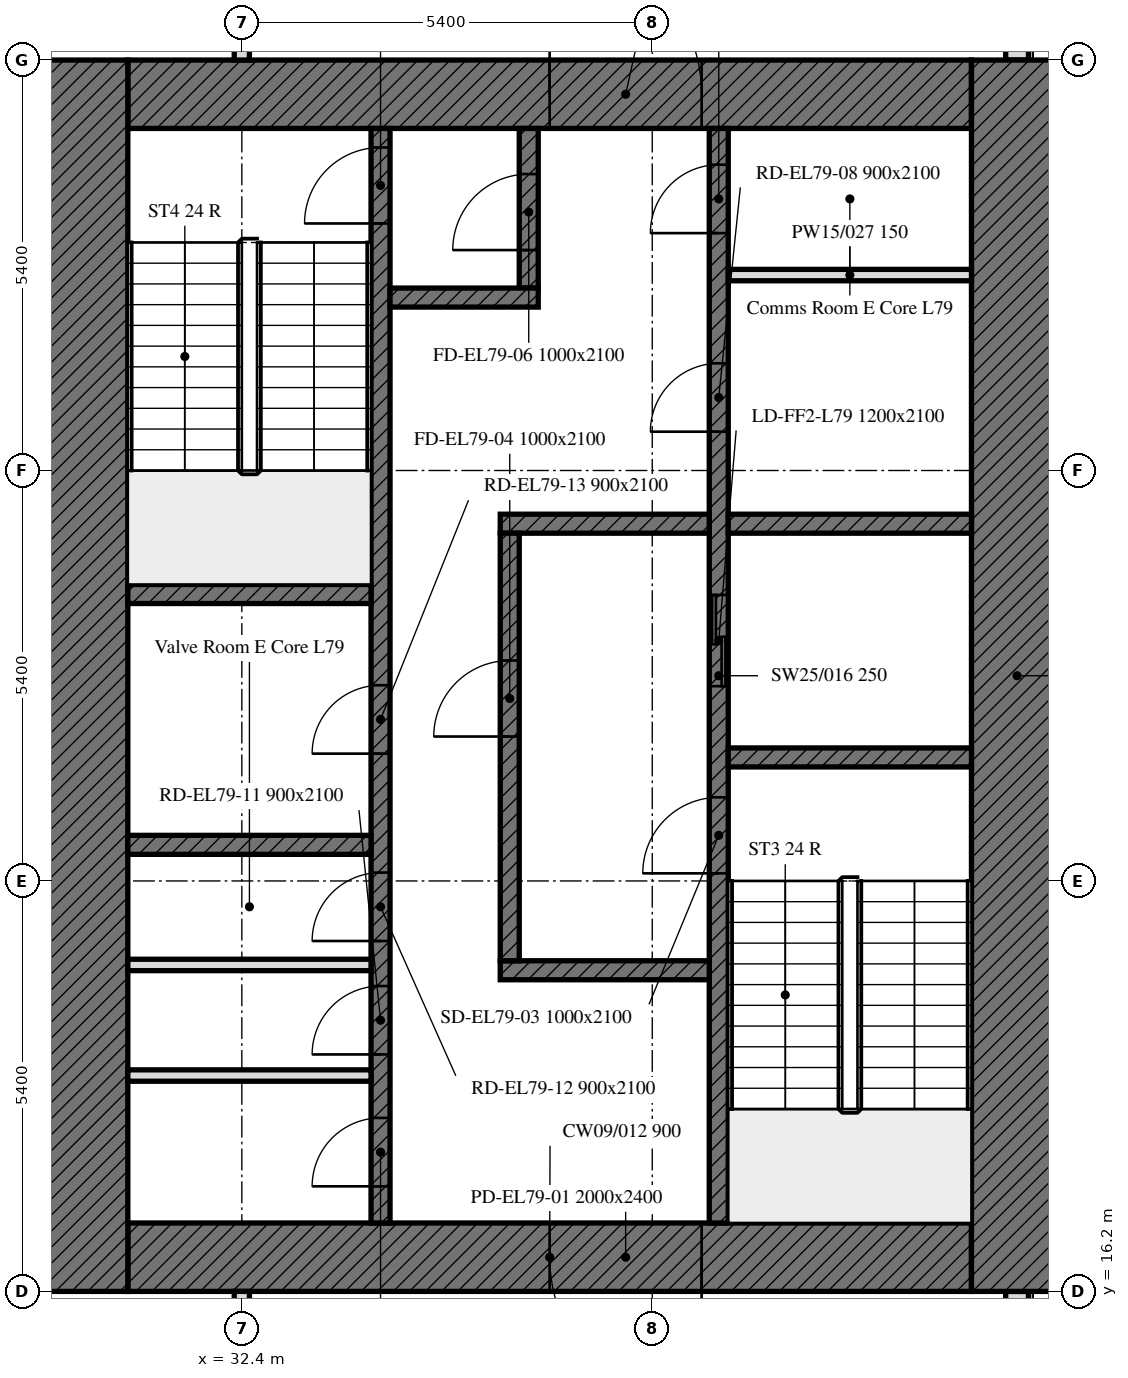
"""IFC4 building model, lengths in metres.
Left out: names, types, materials, properties, quantities, classifications, styles, units other than length and angle.
Written with IfcOpenShell. Run it as: python <this file> out.ifc"""

import sys

from ifc_helpers import new_model, si_unit, direction, frame, frame_2d, origin, place, context, subcontext, project, spatial, polyline, rectangle, outline, extrude, element, fill, save


model = new_model("IFC4")
c1 = context("Model", 3, precision=1e-05, world=origin(), true_north=direction((0.0, 1.0)))
c2 = subcontext(c1, "Body", "Model", "MODEL_VIEW")
j1 = project(units=[si_unit("LENGTHUNIT", "METRE"), si_unit("PLANEANGLEUNIT", "RADIAN")], contexts=[c1])
p1 = place(None, origin())
s1 = spatial("IfcSite", under=j1, at=p1, CompositionType="ELEMENT")
p2 = place(p1, origin())
s2 = spatial("IfcBuilding", under=s1, at=p2, CompositionType="ELEMENT")
p3 = place(p2, frame((0.0, 0.0, 317.2)))
s3 = spatial("IfcBuildingStorey", under=s2, at=p3, CompositionType="ELEMENT", Elevation=317.2)
p4 = place(p3, frame((42.6, 10.986, 0.0), z_axis=(0.0, 0.0, 1.0), x_axis=(0.0, 1.0, 0.0)))
e1 = element("IfcWall", 1, at=p4, inside=s3, PredefinedType="SOLIDWALL", context=c2, shape_type="SweptSolid", body=[
    extrude(outline(polyline([(0.0, 0.0), (5.214, 0.0), (5.214, 4.2), (4.634, 4.2), (4.055, 4.2), (3.476, 4.2), (2.896, 4.2), (2.317, 4.2), (1.738, 4.2), (1.159, 4.2), (0.579, 4.2), (0.0, 4.2), (0.0, 0.0)])), frame((0.0, 0.15, 0.0), z_axis=(0.0, -1.0, 0.0), x_axis=(1.0, 0.0, 0.0)), (0.0, 0.0, 1.0), 0.3),
])
p5 = place(p4, frame((1.014, 0.0, 0.6)))
e2 = element("IfcOpeningElement", 2, at=p5, cuts=e1, PredefinedType="OPENING", context=c2, shape_type="SweptSolid", body=[
    extrude(rectangle(XDim=3.0, YDim=1.8, at=frame_2d((1.5, 0.9))), frame((0.0, 0.16, 0.0), z_axis=(0.0, -1.0, 0.0), x_axis=(1.0, 0.0, 0.0)), (0.0, 0.0, 1.0), 0.32),
])
p6 = place(p3, frame((42.6, 32.4, 0.0), z_axis=(0.0, 0.0, 1.0), x_axis=(0.0, 1.0, 0.0)))
e3 = element("IfcWall", 3, at=p6, inside=s3, PredefinedType="SOLIDWALL", context=c2, shape_type="SweptSolid", body=[
    extrude(outline(polyline([(0.0, 0.0), (10.614, 0.0), (10.614, 4.2), (10.024, 4.2), (9.434, 4.2), (8.845, 4.2), (8.255, 4.2), (7.665, 4.2), (7.076, 4.2), (6.486, 4.2), (5.896, 4.2), (5.307, 4.2), (4.717, 4.2), (4.127, 4.2), (3.538, 4.2), (2.948, 4.2), (2.359, 4.2), (1.769, 4.2), (1.179, 4.2), (0.59, 4.2), (0.0, 4.2), (0.0, 0.0)])), frame((0.0, 0.15, 0.0), z_axis=(0.0, -1.0, 0.0), x_axis=(1.0, 0.0, 0.0)), (0.0, 0.0, 1.0), 0.3),
])
p7 = place(p6, frame((1.2, 0.0, 0.6)))
e4 = element("IfcOpeningElement", 4, at=p7, cuts=e3, PredefinedType="OPENING", context=c2, shape_type="SweptSolid", body=[
    extrude(rectangle(XDim=3.0, YDim=1.8, at=frame_2d((1.5, 0.9))), frame((0.0, 0.16, 0.0), z_axis=(0.0, -1.0, 0.0), x_axis=(1.0, 0.0, 0.0)), (0.0, 0.0, 1.0), 0.32),
])
p8 = place(p6, frame((7.396, 0.0, 0.6)))
e5 = element("IfcOpeningElement", 5, at=p8, cuts=e3, PredefinedType="OPENING", context=c2, shape_type="SweptSolid", body=[
    extrude(rectangle(XDim=1.4, YDim=1.8, at=frame_2d((0.7, 0.9))), frame((0.0, 0.16, 0.0), z_axis=(0.0, -1.0, 0.0), x_axis=(1.0, 0.0, 0.0)), (0.0, 0.0, 1.0), 0.32),
])
p9 = place(p3, frame((42.0, 16.65, 0.0), z_axis=(0.0, 0.0, 1.0), x_axis=(-1.0, 0.0, 0.0)))
e6 = element("IfcWall", 6, at=p9, inside=s3, PredefinedType="SOLIDWALL", context=c2, shape_type="SweptSolid", body=[
    extrude(rectangle(XDim=11.1, YDim=0.9, at=frame_2d((5.55, 0.0))), origin(), (0.0, 0.0, 1.0), 4.2),
])
p10 = place(p9, frame((3.55, 0.0, 0.0)))
e7 = element("IfcOpeningElement", 7, at=p10, cuts=e6, PredefinedType="OPENING", context=c2, shape_type="SweptSolid", body=[
    extrude(rectangle(XDim=2.0, YDim=2.4, at=frame_2d((1.0, 1.2))), frame((0.0, 0.45, 0.0), z_axis=(0.0, -1.0, 0.0), x_axis=(1.0, 0.0, 0.0)), (0.0, 0.0, 1.0), 0.9),
])
p11 = place(p3, frame((30.9, 31.95, 0.0), z_axis=(0.0, 0.0, 1.0), x_axis=(1.0, 0.0, 0.0)))
e8 = element("IfcWall", 8, at=p11, inside=s3, PredefinedType="SOLIDWALL", context=c2, shape_type="SweptSolid", body=[
    extrude(rectangle(XDim=11.1, YDim=0.9, at=frame_2d((5.55, 0.0))), origin(), (0.0, 0.0, 1.0), 4.2),
])
p12 = place(p11, frame((5.55, 0.0, 0.0)))
e9 = element("IfcOpeningElement", 9, at=p12, cuts=e8, PredefinedType="OPENING", context=c2, shape_type="SweptSolid", body=[
    extrude(rectangle(XDim=2.0, YDim=2.4, at=frame_2d((1.0, 1.2))), frame((0.0, 0.45, 0.0), z_axis=(0.0, -1.0, 0.0), x_axis=(1.0, 0.0, 0.0)), (0.0, 0.0, 1.0), 0.9),
])
for number, where, z_axis, x_axis in (
    (10, (42.6, 32.4, 0.0), (0.0, 0.0, 1.0), (0.0, -1.0, 0.0)),
    (11, (30.3, 16.2, 0.0), (0.0, 0.0, 1.0), (0.0, 1.0, 0.0)),
):
    element("IfcWall", number, at=place(p3, frame(where, z_axis=z_axis, x_axis=x_axis)), inside=s3, PredefinedType="SOLIDWALL", context=c2, shape_type="SweptSolid", body=[
        extrude(rectangle(XDim=16.2, YDim=1.2, at=frame_2d((8.1, 0.0))), origin(), (0.0, 0.0, 1.0), 4.2),
    ])
p13 = place(p3, frame((38.675, 17.1, 0.0), z_axis=(0.0, 0.0, 1.0), x_axis=(0.0, 1.0, 0.0)))
e12 = element("IfcWall", 12, at=p13, inside=s3, PredefinedType="SOLIDWALL", context=c2, shape_type="SweptSolid", body=[
    extrude(rectangle(XDim=14.4, YDim=0.25, at=frame_2d((7.2, 0.0))), origin(), (0.0, 0.0, 1.0), 4.2),
])
p14 = place(p13, frame((4.6, 0.0, 0.0)))
e13 = element("IfcOpeningElement", 13, at=p14, cuts=e12, PredefinedType="OPENING", context=c2, shape_type="SweptSolid", body=[
    extrude(rectangle(XDim=1.0, YDim=2.1, at=frame_2d((0.5, 1.05))), frame((0.0, 0.125, 0.0), z_axis=(0.0, -1.0, 0.0), x_axis=(1.0, 0.0, 0.0)), (0.0, 0.0, 1.0), 0.25),
])
p15 = place(p13, frame((7.062, 0.0, 0.0)))
e14 = element("IfcOpeningElement", 14, at=p15, cuts=e12, PredefinedType="OPENING", context=c2, shape_type="SweptSolid", body=[
    extrude(rectangle(XDim=1.2, YDim=2.1, at=frame_2d((0.6, 1.05))), frame((0.0, 0.125, 0.0), z_axis=(0.0, -1.0, 0.0), x_axis=(1.0, 0.0, 0.0)), (0.0, 0.0, 1.0), 0.25),
])
p16 = place(p13, frame((10.41, 0.0, 0.0)))
e15 = element("IfcOpeningElement", 15, at=p16, cuts=e12, PredefinedType="OPENING", context=c2, shape_type="SweptSolid", body=[
    extrude(rectangle(XDim=0.9, YDim=2.1, at=frame_2d((0.45, 1.05))), frame((0.0, 0.125, 0.0), z_axis=(0.0, -1.0, 0.0), x_axis=(1.0, 0.0, 0.0)), (0.0, 0.0, 1.0), 0.25),
])
p17 = place(p13, frame((13.023, 0.0, 0.0)))
e16 = element("IfcOpeningElement", 16, at=p17, cuts=e12, PredefinedType="OPENING", context=c2, shape_type="SweptSolid", body=[
    extrude(rectangle(XDim=0.9, YDim=2.1, at=frame_2d((0.45, 1.05))), frame((0.0, 0.125, 0.0), z_axis=(0.0, -1.0, 0.0), x_axis=(1.0, 0.0, 0.0)), (0.0, 0.0, 1.0), 0.25),
])
p18 = place(p3, frame((34.225, 17.1, 0.0), z_axis=(0.0, 0.0, 1.0), x_axis=(0.0, 1.0, 0.0)))
e17 = element("IfcWall", 17, at=p18, inside=s3, PredefinedType="SOLIDWALL", context=c2, shape_type="SweptSolid", body=[
    extrude(rectangle(XDim=14.4, YDim=0.25, at=frame_2d((7.2, 0.0))), origin(), (0.0, 0.0, 1.0), 4.2),
])
p19 = place(p18, frame((13.15, 0.0, 0.0)))
e18 = element("IfcOpeningElement", 18, at=p19, cuts=e17, PredefinedType="OPENING", context=c2, shape_type="SweptSolid", body=[
    extrude(rectangle(XDim=1.0, YDim=2.1, at=frame_2d((0.5, 1.05))), frame((0.0, 0.125, 0.0), z_axis=(0.0, -1.0, 0.0), x_axis=(1.0, 0.0, 0.0)), (0.0, 0.0, 1.0), 0.25),
])
p20 = place(p18, frame((0.482, 0.0, 0.0)))
e19 = element("IfcOpeningElement", 19, at=p20, cuts=e17, PredefinedType="OPENING", context=c2, shape_type="SweptSolid", body=[
    extrude(rectangle(XDim=0.9, YDim=2.1, at=frame_2d((0.45, 1.05))), frame((0.0, 0.125, 0.0), z_axis=(0.0, -1.0, 0.0), x_axis=(1.0, 0.0, 0.0)), (0.0, 0.0, 1.0), 0.25),
])
p21 = place(p18, frame((2.218, 0.0, 0.0)))
e20 = element("IfcOpeningElement", 20, at=p21, cuts=e17, PredefinedType="OPENING", context=c2, shape_type="SweptSolid", body=[
    extrude(rectangle(XDim=0.9, YDim=2.1, at=frame_2d((0.45, 1.05))), frame((0.0, 0.125, 0.0), z_axis=(0.0, -1.0, 0.0), x_axis=(1.0, 0.0, 0.0)), (0.0, 0.0, 1.0), 0.25),
])
p22 = place(p18, frame((3.71, 0.0, 0.0)))
e21 = element("IfcOpeningElement", 21, at=p22, cuts=e17, PredefinedType="OPENING", context=c2, shape_type="SweptSolid", body=[
    extrude(rectangle(XDim=0.9, YDim=2.1, at=frame_2d((0.45, 1.05))), frame((0.0, 0.125, 0.0), z_axis=(0.0, -1.0, 0.0), x_axis=(1.0, 0.0, 0.0)), (0.0, 0.0, 1.0), 0.25),
])
p23 = place(p18, frame((6.175, 0.0, 0.0)))
e22 = element("IfcOpeningElement", 22, at=p23, cuts=e17, PredefinedType="OPENING", context=c2, shape_type="SweptSolid", body=[
    extrude(rectangle(XDim=0.9, YDim=2.1, at=frame_2d((0.45, 1.05))), frame((0.0, 0.125, 0.0), z_axis=(0.0, -1.0, 0.0), x_axis=(1.0, 0.0, 0.0)), (0.0, 0.0, 1.0), 0.25),
])
p24 = place(p3, frame((38.8, 23.225, 0.0), z_axis=(0.0, 0.0, 1.0), x_axis=(1.0, 0.0, 0.0)))
e23 = element("IfcWall", 23, at=p24, inside=s3, PredefinedType="SOLIDWALL", context=c2, shape_type="SweptSolid", body=[
    extrude(rectangle(XDim=3.2, YDim=0.25, at=frame_2d((1.6, 0.0))), origin(), (0.0, 0.0, 1.0), 4.2),
])
for number, where, z_axis, x_axis in (
    (24, (30.9, 25.375, 0.0), (0.0, 0.0, 1.0), (1.0, 0.0, 0.0)),
    (25, (30.9, 22.075, 0.0), (0.0, 0.0, 1.0), (1.0, 0.0, 0.0)),
):
    element("IfcWall", number, at=place(p3, frame(where, z_axis=z_axis, x_axis=x_axis)), inside=s3, PredefinedType="SOLIDWALL", context=c2, shape_type="SweptSolid", body=[
        extrude(rectangle(XDim=3.2, YDim=0.25, at=frame_2d((1.6, 0.0))), origin(), (0.0, 0.0, 1.0), 4.2),
    ])
p25 = place(p3, frame((38.8, 26.3, 0.0), z_axis=(0.0, 0.0, 1.0), x_axis=(1.0, 0.0, 0.0)))
e26 = element("IfcWall", 26, at=p25, inside=s3, PredefinedType="SOLIDWALL", context=c2, shape_type="SweptSolid", body=[
    extrude(rectangle(XDim=3.2, YDim=0.25, at=frame_2d((1.6, 0.0))), origin(), (0.0, 0.0, 1.0), 4.2),
])
for number, where, z_axis, x_axis in (
    (27, (35.8, 26.3, 0.0), (0.0, 0.0, 1.0), (1.0, 0.0, 0.0)),
    (28, (35.8, 20.425, 0.0), (0.0, 0.0, 1.0), (1.0, 0.0, 0.0)),
):
    element("IfcWall", number, at=place(p3, frame(where, z_axis=z_axis, x_axis=x_axis)), inside=s3, PredefinedType="SOLIDWALL", context=c2, shape_type="SweptSolid", body=[
        extrude(rectangle(XDim=2.75, YDim=0.25, at=frame_2d((1.375, 0.0))), origin(), (0.0, 0.0, 1.0), 4.2),
    ])
p26 = place(p3, frame((36.175, 29.4, 0.0), z_axis=(0.0, 0.0, 1.0), x_axis=(0.0, 1.0, 0.0)))
e29 = element("IfcWall", 29, at=p26, inside=s3, PredefinedType="SOLIDWALL", context=c2, shape_type="SweptSolid", body=[
    extrude(rectangle(XDim=2.1, YDim=0.25, at=frame_2d((1.05, 0.0))), origin(), (0.0, 0.0, 1.0), 4.2),
])
p27 = place(p26, frame((0.5, 0.0, 0.0)))
e30 = element("IfcOpeningElement", 30, at=p27, cuts=e29, PredefinedType="OPENING", context=c2, shape_type="SweptSolid", body=[
    extrude(rectangle(XDim=1.0, YDim=2.1, at=frame_2d((0.5, 1.05))), frame((0.0, 0.125, 0.0), z_axis=(0.0, -1.0, 0.0), x_axis=(1.0, 0.0, 0.0)), (0.0, 0.0, 1.0), 0.25),
])
p28 = place(p3, frame((34.35, 29.275, 0.0), z_axis=(0.0, 0.0, 1.0), x_axis=(1.0, 0.0, 0.0)))
e31 = element("IfcWall", 31, at=p28, inside=s3, PredefinedType="SOLIDWALL", context=c2, shape_type="SweptSolid", body=[
    extrude(rectangle(XDim=1.95, YDim=0.25, at=frame_2d((0.975, 0.0))), origin(), (0.0, 0.0, 1.0), 4.2),
])
p29 = place(p3, frame((35.925, 20.55, 0.0), z_axis=(0.0, 0.0, 1.0), x_axis=(0.0, 1.0, 0.0)))
e32 = element("IfcWall", 32, at=p29, inside=s3, PredefinedType="SOLIDWALL", context=c2, shape_type="SweptSolid", body=[
    extrude(rectangle(XDim=5.625, YDim=0.25, at=frame_2d((2.812, 0.0))), origin(), (0.0, 0.0, 1.0), 4.2),
])
p30 = place(p29, frame((2.95, 0.0, 0.0)))
e33 = element("IfcOpeningElement", 33, at=p30, cuts=e32, PredefinedType="OPENING", context=c2, shape_type="SweptSolid", body=[
    extrude(rectangle(XDim=1.0, YDim=2.1, at=frame_2d((0.5, 1.05))), frame((0.0, 0.125, 0.0), z_axis=(0.0, -1.0, 0.0), x_axis=(1.0, 0.0, 0.0)), (0.0, 0.0, 1.0), 0.25),
])
p31 = place(p3, frame((38.8, 29.571, 0.0), z_axis=(0.0, 0.0, 1.0), x_axis=(1.0, 0.0, 0.0)))
e34 = element("IfcWall", 34, at=p31, inside=s3, PredefinedType="PARTITIONING", context=c2, shape_type="SweptSolid", body=[
    extrude(rectangle(XDim=3.2, YDim=0.15, at=frame_2d((1.6, 0.0))), origin(), (0.0, 0.0, 1.0), 4.2),
])
for number, where, z_axis, x_axis in (
    (35, (30.9, 19.04, 0.0), (0.0, 0.0, 1.0), (1.0, 0.0, 0.0)),
    (36, (30.9, 20.495, 0.0), (0.0, 0.0, 1.0), (1.0, 0.0, 0.0)),
):
    element("IfcWall", number, at=place(p3, frame(where, z_axis=z_axis, x_axis=x_axis)), inside=s3, PredefinedType="PARTITIONING", context=c2, shape_type="SweptSolid", body=[
        extrude(rectangle(XDim=3.2, YDim=0.15, at=frame_2d((1.6, 0.0))), origin(), (0.0, 0.0, 1.0), 4.2),
    ])
p32 = place(p3, frame((32.4, 32.4, 0.0), z_axis=(0.0, 0.0, 1.0), x_axis=(0.0, 1.0, 0.0)))
e37 = element("IfcWall", 37, at=p32, inside=s3, PredefinedType="PARTITIONING", context=c2, shape_type="SweptSolid", body=[
    extrude(rectangle(XDim=5.105, YDim=0.2, at=frame_2d((2.552, 0.0))), origin(), (0.0, 0.0, 1.0), 3.45),
])
p33 = place(p3, frame((32.4, 13.15, 0.0), z_axis=(0.0, 0.0, 1.0), x_axis=(0.0, 1.0, 0.0)))
e38 = element("IfcWall", 38, at=p33, inside=s3, PredefinedType="PARTITIONING", context=c2, shape_type="SweptSolid", body=[
    extrude(rectangle(XDim=3.05, YDim=0.2, at=frame_2d((1.525, 0.0))), origin(), (0.0, 0.0, 1.0), 4.2),
])
p34 = place(p10, origin())
e39 = element("IfcDoor", 39, at=p34, inside=s3, OperationType="DOUBLE_DOOR_SINGLE_SWING", PredefinedType="DOOR", context=c2, shape_type="SweptSolid", body=[
    extrude(rectangle(XDim=2.0, YDim=2.4, at=frame_2d((1.0, 1.2))), frame((0.0, 0.025, 0.0), z_axis=(0.0, -1.0, 0.0), x_axis=(1.0, 0.0, 0.0)), (0.0, 0.0, 1.0), 0.05),
])
fill(e7, e39)
p35 = place(p12, origin())
e40 = element("IfcDoor", 40, at=p35, inside=s3, OperationType="DOUBLE_DOOR_SINGLE_SWING", PredefinedType="DOOR", context=c2, shape_type="SweptSolid", body=[
    extrude(rectangle(XDim=2.0, YDim=2.4, at=frame_2d((1.0, 1.2))), frame((0.0, 0.025, 0.0), z_axis=(0.0, -1.0, 0.0), x_axis=(1.0, 0.0, 0.0)), (0.0, 0.0, 1.0), 0.05),
])
fill(e9, e40)
p36 = place(p14, origin())
e41 = element("IfcDoor", 41, at=p36, inside=s3, OperationType="SINGLE_SWING_LEFT", PredefinedType="DOOR", context=c2, shape_type="SweptSolid", body=[
    extrude(rectangle(XDim=1.0, YDim=2.1, at=frame_2d((0.5, 1.05))), frame((0.0, 0.025, 0.0), z_axis=(0.0, -1.0, 0.0), x_axis=(1.0, 0.0, 0.0)), (0.0, 0.0, 1.0), 0.05),
])
fill(e13, e41)
p37 = place(p30, origin())
e42 = element("IfcDoor", 42, at=p37, inside=s3, OperationType="SINGLE_SWING_LEFT", PredefinedType="DOOR", context=c2, shape_type="SweptSolid", body=[
    extrude(rectangle(XDim=1.0, YDim=2.1, at=frame_2d((0.5, 1.05))), frame((0.0, 0.025, 0.0), z_axis=(0.0, -1.0, 0.0), x_axis=(1.0, 0.0, 0.0)), (0.0, 0.0, 1.0), 0.05),
])
fill(e33, e42)
p38 = place(p19, origin())
e43 = element("IfcDoor", 43, at=p38, inside=s3, OperationType="SINGLE_SWING_LEFT", PredefinedType="DOOR", context=c2, shape_type="SweptSolid", body=[
    extrude(rectangle(XDim=1.0, YDim=2.1, at=frame_2d((0.5, 1.05))), frame((0.0, 0.025, 0.0), z_axis=(0.0, -1.0, 0.0), x_axis=(1.0, 0.0, 0.0)), (0.0, 0.0, 1.0), 0.05),
])
fill(e18, e43)
p39 = place(p27, origin())
e44 = element("IfcDoor", 44, at=p39, inside=s3, OperationType="SINGLE_SWING_LEFT", PredefinedType="DOOR", context=c2, shape_type="SweptSolid", body=[
    extrude(rectangle(XDim=1.0, YDim=2.1, at=frame_2d((0.5, 1.05))), frame((0.0, 0.025, 0.0), z_axis=(0.0, -1.0, 0.0), x_axis=(1.0, 0.0, 0.0)), (0.0, 0.0, 1.0), 0.05),
])
fill(e30, e44)
p40 = place(p15, origin())
e45 = element("IfcDoor", 45, at=p40, inside=s3, OperationType="DOUBLE_DOOR_SLIDING", PredefinedType="DOOR", context=c2, shape_type="SweptSolid", body=[
    extrude(rectangle(XDim=1.2, YDim=2.1, at=frame_2d((0.6, 1.05))), frame((0.0, 0.025, 0.0), z_axis=(0.0, -1.0, 0.0), x_axis=(1.0, 0.0, 0.0)), (0.0, 0.0, 1.0), 0.05),
])
fill(e14, e45)
p41 = place(p16, origin())
e46 = element("IfcDoor", 46, at=p41, inside=s3, OperationType="SINGLE_SWING_LEFT", PredefinedType="DOOR", context=c2, shape_type="SweptSolid", body=[
    extrude(rectangle(XDim=0.9, YDim=2.1, at=frame_2d((0.45, 1.05))), frame((0.0, 0.025, 0.0), z_axis=(0.0, -1.0, 0.0), x_axis=(1.0, 0.0, 0.0)), (0.0, 0.0, 1.0), 0.05),
])
fill(e15, e46)
p42 = place(p17, origin())
e47 = element("IfcDoor", 47, at=p42, inside=s3, OperationType="SINGLE_SWING_LEFT", PredefinedType="DOOR", context=c2, shape_type="SweptSolid", body=[
    extrude(rectangle(XDim=0.9, YDim=2.1, at=frame_2d((0.45, 1.05))), frame((0.0, 0.025, 0.0), z_axis=(0.0, -1.0, 0.0), x_axis=(1.0, 0.0, 0.0)), (0.0, 0.0, 1.0), 0.05),
])
fill(e16, e47)
p43 = place(p20, origin())
e48 = element("IfcDoor", 48, at=p43, inside=s3, OperationType="SINGLE_SWING_LEFT", PredefinedType="DOOR", context=c2, shape_type="SweptSolid", body=[
    extrude(rectangle(XDim=0.9, YDim=2.1, at=frame_2d((0.45, 1.05))), frame((0.0, 0.025, 0.0), z_axis=(0.0, -1.0, 0.0), x_axis=(1.0, 0.0, 0.0)), (0.0, 0.0, 1.0), 0.05),
])
fill(e19, e48)
p44 = place(p21, origin())
e49 = element("IfcDoor", 49, at=p44, inside=s3, OperationType="SINGLE_SWING_LEFT", PredefinedType="DOOR", context=c2, shape_type="SweptSolid", body=[
    extrude(rectangle(XDim=0.9, YDim=2.1, at=frame_2d((0.45, 1.05))), frame((0.0, 0.025, 0.0), z_axis=(0.0, -1.0, 0.0), x_axis=(1.0, 0.0, 0.0)), (0.0, 0.0, 1.0), 0.05),
])
fill(e20, e49)
p45 = place(p22, origin())
e50 = element("IfcDoor", 50, at=p45, inside=s3, OperationType="SINGLE_SWING_LEFT", PredefinedType="DOOR", context=c2, shape_type="SweptSolid", body=[
    extrude(rectangle(XDim=0.9, YDim=2.1, at=frame_2d((0.45, 1.05))), frame((0.0, 0.025, 0.0), z_axis=(0.0, -1.0, 0.0), x_axis=(1.0, 0.0, 0.0)), (0.0, 0.0, 1.0), 0.05),
])
fill(e21, e50)
p46 = place(p23, origin())
e51 = element("IfcDoor", 51, at=p46, inside=s3, OperationType="SINGLE_SWING_LEFT", PredefinedType="DOOR", context=c2, shape_type="SweptSolid", body=[
    extrude(rectangle(XDim=0.9, YDim=2.1, at=frame_2d((0.45, 1.05))), frame((0.0, 0.025, 0.0), z_axis=(0.0, -1.0, 0.0), x_axis=(1.0, 0.0, 0.0)), (0.0, 0.0, 1.0), 0.05),
])
fill(e22, e51)
save(model, sys.argv[1])
